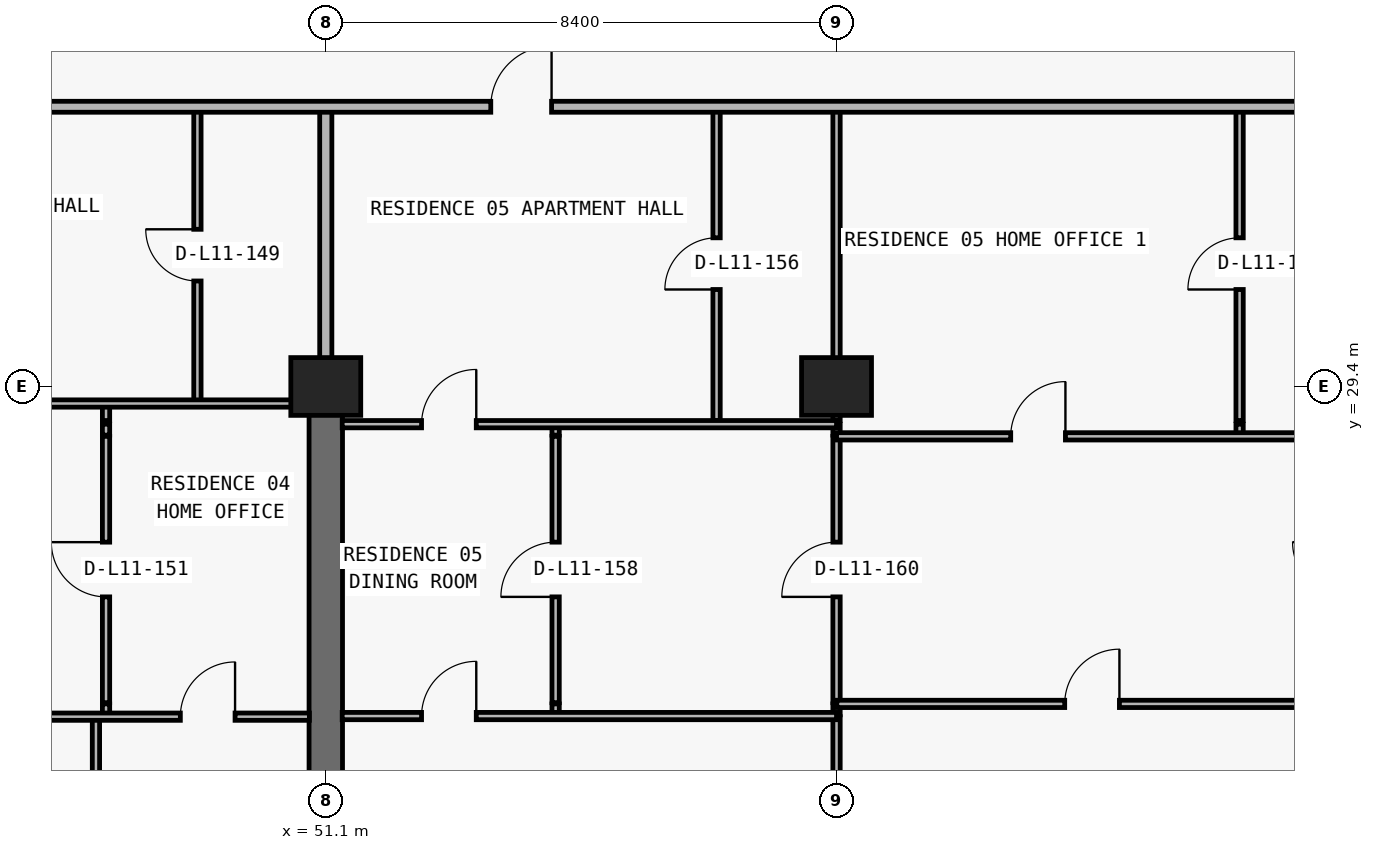
"""IFC4 building model, lengths in metres.
Left out: names, types, materials, properties, quantities, classifications, styles, units other than length and angle.
Written with IfcOpenShell. Run it as: python <this file> out.ifc"""

import sys

from ifc_helpers import new_model, si_unit, direction, frame, frame_2d, origin, origin_2d, place, context, subcontext, project, spatial, rectangle, extrude, element, fill, save


model = new_model("IFC4")
c1 = context("Model", 3, precision=1e-05, world=origin(), true_north=direction((0.0, 1.0)))
c2 = subcontext(c1, "Body", "Model", "MODEL_VIEW")
j1 = project(units=[si_unit("LENGTHUNIT", "METRE"), si_unit("PLANEANGLEUNIT", "RADIAN")], contexts=[c1])
p1 = place(None, origin())
s1 = spatial("IfcSite", under=j1, at=p1, CompositionType="ELEMENT")
p2 = place(p1, origin())
s2 = spatial("IfcBuilding", under=s1, at=p2, CompositionType="ELEMENT")
p3 = place(p2, frame((0.0, 0.0, 46.5)))
s3 = spatial("IfcBuildingStorey", under=s2, at=p3, CompositionType="ELEMENT", Elevation=46.5)
for number, where, z_axis, x_axis in (
    (1, (51.1, 29.4, 0.0), (0.0, 0.0, 1.0), (1.0, 0.0, 0.0)),
    (2, (59.5, 29.4, 0.0), (0.0, 0.0, 1.0), (1.0, 0.0, 0.0)),
):
    element("IfcColumn", number, at=place(p3, frame(where, z_axis=z_axis, x_axis=x_axis)), inside=s3, PredefinedType="COLUMN", context=c2, shape_type="SweptSolid", body=[
        extrude(rectangle(XDim=1.15, YDim=0.95, at=origin_2d()), origin(), (0.0, 0.0, 1.0), 3.05),
    ])
p4 = place(p3, frame((51.1, 20.8, 0.0), z_axis=(0.0, 0.0, 1.0), x_axis=(0.0, 1.0, 0.0)))
e3 = element("IfcWall", 3, at=p4, inside=s3, PredefinedType="SHEAR", context=c2, shape_type="SweptSolid", body=[
    extrude(rectangle(XDim=8.6, YDim=0.55, at=frame_2d((4.3, 0.0))), origin(), (0.0, 0.0, 1.0), 3.05),
])
p5 = place(p3, frame((47.32, 6.24, 0.0), z_axis=(0.0, 0.0, 1.0), x_axis=(0.0, 1.0, 0.0)))
e4 = element("IfcWall", 4, at=p5, inside=s3, PredefinedType="PARTITIONING", context=c2, shape_type="SweptSolid", body=[
    extrude(rectangle(XDim=17.73, YDim=0.12, at=frame_2d((8.865, 0.0))), origin(), (0.0, 0.0, 1.0), 3.05),
])
p6 = place(p3, frame((47.486, 24.0, 0.0), z_axis=(0.0, 0.0, 1.0), x_axis=(0.0, 1.0, 0.0)))
e5 = element("IfcWall", 5, at=p6, inside=s3, PredefinedType="PARTITIONING", context=c2, shape_type="SweptSolid", body=[
    extrude(rectangle(XDim=0.18, YDim=0.12, at=frame_2d((0.09, 0.0))), origin(), (0.0, 0.0, 1.0), 3.05),
])
p7 = place(p3, frame((47.486, 24.2, 0.0), z_axis=(0.0, 0.0, 1.0), x_axis=(0.0, 1.0, 0.0)))
e6 = element("IfcWall", 6, at=p7, inside=s3, PredefinedType="PARTITIONING", context=c2, shape_type="SweptSolid", body=[
    extrude(rectangle(XDim=4.38, YDim=0.12, at=frame_2d((2.19, 0.0))), origin(), (0.0, 0.0, 1.0), 3.05),
])
p8 = place(p7, frame((1.74, 0.0, 0.0)))
e7 = element("IfcOpeningElement", 7, at=p8, cuts=e6, PredefinedType="OPENING", context=c2, shape_type="SweptSolid", body=[
    extrude(rectangle(XDim=0.9, YDim=2.15, at=frame_2d((0.45, 1.075))), frame((0.0, 0.07, 0.0), z_axis=(0.0, -1.0, 0.0), x_axis=(1.0, 0.0, 0.0)), (0.0, 0.0, 1.0), 0.14),
])
p9 = place(p3, frame((47.486, 28.6, 0.0), z_axis=(0.0, 0.0, 1.0), x_axis=(0.0, 1.0, 0.0)))
e8 = element("IfcWall", 8, at=p9, inside=s3, PredefinedType="PARTITIONING", context=c2, shape_type="SweptSolid", body=[
    extrude(rectangle(XDim=0.18, YDim=0.12, at=frame_2d((0.09, 0.0))), origin(), (0.0, 0.0, 1.0), 3.05),
])
p10 = place(p3, frame((47.486, 28.84, 0.0), z_axis=(0.0, 0.0, 1.0), x_axis=(0.0, 1.0, 0.0)))
e9 = element("IfcWall", 9, at=p10, inside=s3, PredefinedType="PARTITIONING", context=c2, shape_type="SweptSolid", body=[
    extrude(rectangle(XDim=0.28, YDim=0.12, at=frame_2d((0.14, 0.0))), origin(), (0.0, 0.0, 1.0), 3.05),
])
p11 = place(p3, frame((48.989, 29.12, 0.0), z_axis=(0.0, 0.0, 1.0), x_axis=(0.0, 1.0, 0.0)))
e10 = element("IfcWall", 10, at=p11, inside=s3, PredefinedType="PARTITIONING", context=c2, shape_type="SweptSolid", body=[
    extrude(rectangle(XDim=4.88, YDim=0.12, at=frame_2d((2.44, 0.0))), origin(), (0.0, 0.0, 1.0), 3.05),
])
p12 = place(p11, frame((2.015, 0.0, 0.0)))
e11 = element("IfcOpeningElement", 11, at=p12, cuts=e10, PredefinedType="OPENING", context=c2, shape_type="SweptSolid", body=[
    extrude(rectangle(XDim=0.85, YDim=2.1, at=frame_2d((0.425, 1.05))), frame((0.0, 0.07, 0.0), z_axis=(0.0, -1.0, 0.0), x_axis=(1.0, 0.0, 0.0)), (0.0, 0.0, 1.0), 0.14),
])
p13 = place(p3, frame((51.1, 29.405, 0.0), z_axis=(0.0, 0.0, 1.0), x_axis=(0.0, 1.0, 0.0)))
e12 = element("IfcWall", 12, at=p13, inside=s3, PredefinedType="PARTITIONING", context=c2, shape_type="SweptSolid", body=[
    extrude(rectangle(XDim=4.595, YDim=0.2, at=frame_2d((2.297, 0.0))), origin(), (0.0, 0.0, 1.0), 2.335),
])
p14 = place(p3, frame((54.88, 24.0, 0.0), z_axis=(0.0, 0.0, 1.0), x_axis=(0.0, 1.0, 0.0)))
e13 = element("IfcWall", 13, at=p14, inside=s3, PredefinedType="PARTITIONING", context=c2, shape_type="SweptSolid", body=[
    extrude(rectangle(XDim=0.18, YDim=0.12, at=frame_2d((0.09, 0.0))), origin(), (0.0, 0.0, 1.0), 3.05),
])
p15 = place(p3, frame((54.88, 24.2, 0.0), z_axis=(0.0, 0.0, 1.0), x_axis=(0.0, 1.0, 0.0)))
e14 = element("IfcWall", 14, at=p15, inside=s3, PredefinedType="PARTITIONING", context=c2, shape_type="SweptSolid", body=[
    extrude(rectangle(XDim=4.38, YDim=0.12, at=frame_2d((2.19, 0.0))), origin(), (0.0, 0.0, 1.0), 3.05),
])
p16 = place(p15, frame((1.74, 0.0, 0.0)))
e15 = element("IfcOpeningElement", 15, at=p16, cuts=e14, PredefinedType="OPENING", context=c2, shape_type="SweptSolid", body=[
    extrude(rectangle(XDim=0.9, YDim=2.15, at=frame_2d((0.45, 1.075))), frame((0.0, 0.07, 0.0), z_axis=(0.0, -1.0, 0.0), x_axis=(1.0, 0.0, 0.0)), (0.0, 0.0, 1.0), 0.14),
])
p17 = place(p3, frame((54.88, 28.6, 0.0), z_axis=(0.0, 0.0, 1.0), x_axis=(0.0, 1.0, 0.0)))
e16 = element("IfcWall", 16, at=p17, inside=s3, PredefinedType="PARTITIONING", context=c2, shape_type="SweptSolid", body=[
    extrude(rectangle(XDim=0.18, YDim=0.12, at=frame_2d((0.09, 0.0))), origin(), (0.0, 0.0, 1.0), 3.05),
])
p18 = place(p3, frame((57.527, 28.84, 0.0), z_axis=(0.0, 0.0, 1.0), x_axis=(0.0, 1.0, 0.0)))
e17 = element("IfcWall", 17, at=p18, inside=s3, PredefinedType="PARTITIONING", context=c2, shape_type="SweptSolid", body=[
    extrude(rectangle(XDim=5.16, YDim=0.12, at=frame_2d((2.58, 0.0))), origin(), (0.0, 0.0, 1.0), 3.05),
])
p19 = place(p18, frame((2.155, 0.0, 0.0)))
e18 = element("IfcOpeningElement", 18, at=p19, cuts=e17, PredefinedType="OPENING", context=c2, shape_type="SweptSolid", body=[
    extrude(rectangle(XDim=0.85, YDim=2.1, at=frame_2d((0.425, 1.05))), frame((0.0, 0.07, 0.0), z_axis=(0.0, -1.0, 0.0), x_axis=(1.0, 0.0, 0.0)), (0.0, 0.0, 1.0), 0.14),
])
p20 = place(p3, frame((59.5, 6.24, 0.0), z_axis=(0.0, 0.0, 1.0), x_axis=(0.0, 1.0, 0.0)))
e19 = element("IfcWall", 19, at=p20, inside=s3, PredefinedType="PARTITIONING", context=c2, shape_type="SweptSolid", body=[
    extrude(rectangle(XDim=17.73, YDim=0.12, at=frame_2d((8.865, 0.0))), origin(), (0.0, 0.0, 1.0), 2.11),
])
p21 = place(p3, frame((59.5, 24.0, 0.0), z_axis=(0.0, 0.0, 1.0), x_axis=(0.0, 1.0, 0.0)))
e20 = element("IfcWall", 20, at=p21, inside=s3, PredefinedType="PARTITIONING", context=c2, shape_type="SweptSolid", body=[
    extrude(rectangle(XDim=0.18, YDim=0.12, at=frame_2d((0.09, 0.0))), origin(), (0.0, 0.0, 1.0), 2.11),
])
p22 = place(p3, frame((59.5, 24.2, 0.0), z_axis=(0.0, 0.0, 1.0), x_axis=(0.0, 1.0, 0.0)))
e21 = element("IfcWall", 21, at=p22, inside=s3, PredefinedType="PARTITIONING", context=c2, shape_type="SweptSolid", body=[
    extrude(rectangle(XDim=4.38, YDim=0.12, at=frame_2d((2.19, 0.0))), origin(), (0.0, 0.0, 1.0), 2.11),
])
p23 = place(p22, frame((1.74, 0.0, 0.0)))
e22 = element("IfcOpeningElement", 22, at=p23, cuts=e21, PredefinedType="OPENING", context=c2, shape_type="SweptSolid", body=[
    extrude(rectangle(XDim=0.9, YDim=2.06, at=frame_2d((0.45, 1.03))), frame((0.0, 0.07, 0.0), z_axis=(0.0, -1.0, 0.0), x_axis=(1.0, 0.0, 0.0)), (0.0, 0.0, 1.0), 0.14),
])
p24 = place(p3, frame((59.5, 28.6, 0.0), z_axis=(0.0, 0.0, 1.0), x_axis=(0.0, 1.0, 0.0)))
e23 = element("IfcWall", 23, at=p24, inside=s3, PredefinedType="PARTITIONING", context=c2, shape_type="SweptSolid", body=[
    extrude(rectangle(XDim=0.18, YDim=0.12, at=frame_2d((0.09, 0.0))), origin(), (0.0, 0.0, 1.0), 2.11),
])
p25 = place(p3, frame((59.5, 28.84, 0.0), z_axis=(0.0, 0.0, 1.0), x_axis=(0.0, 1.0, 0.0)))
e24 = element("IfcWall", 24, at=p25, inside=s3, PredefinedType="PARTITIONING", context=c2, shape_type="SweptSolid", body=[
    extrude(rectangle(XDim=5.16, YDim=0.12, at=frame_2d((2.58, 0.0))), origin(), (0.0, 0.0, 1.0), 2.11),
])
p26 = place(p3, frame((66.129, 28.6, 0.0), z_axis=(0.0, 0.0, 1.0), x_axis=(0.0, 1.0, 0.0)))
e25 = element("IfcWall", 25, at=p26, inside=s3, PredefinedType="PARTITIONING", context=c2, shape_type="SweptSolid", body=[
    extrude(rectangle(XDim=0.18, YDim=0.12, at=frame_2d((0.09, 0.0))), origin(), (0.0, 0.0, 1.0), 3.05),
])
p27 = place(p3, frame((66.129, 28.84, 0.0), z_axis=(0.0, 0.0, 1.0), x_axis=(0.0, 1.0, 0.0)))
e26 = element("IfcWall", 26, at=p27, inside=s3, PredefinedType="PARTITIONING", context=c2, shape_type="SweptSolid", body=[
    extrude(rectangle(XDim=5.16, YDim=0.12, at=frame_2d((2.58, 0.0))), origin(), (0.0, 0.0, 1.0), 3.05),
])
p28 = place(p27, frame((2.155, 0.0, 0.0)))
e27 = element("IfcOpeningElement", 27, at=p28, cuts=e26, PredefinedType="OPENING", context=c2, shape_type="SweptSolid", body=[
    extrude(rectangle(XDim=0.85, YDim=2.1, at=frame_2d((0.425, 1.05))), frame((0.0, 0.07, 0.0), z_axis=(0.0, -1.0, 0.0), x_axis=(1.0, 0.0, 0.0)), (0.0, 0.0, 1.0), 0.14),
])
p29 = place(p3, frame((42.7, 23.97, 0.0), z_axis=(0.0, 0.0, 1.0), x_axis=(1.0, 0.0, 0.0)))
e28 = element("IfcWall", 28, at=p29, inside=s3, PredefinedType="PARTITIONING", context=c2, shape_type="SweptSolid", body=[
    extrude(rectangle(XDim=8.13, YDim=0.12, at=frame_2d((4.065, 0.0))), origin(), (0.0, 0.0, 1.0), 3.05),
])
p30 = place(p29, frame((1.86, 0.0, 0.0)))
e29 = element("IfcOpeningElement", 29, at=p30, cuts=e28, PredefinedType="OPENING", context=c2, shape_type="SweptSolid", body=[
    extrude(rectangle(XDim=0.9, YDim=2.15, at=frame_2d((0.45, 1.075))), frame((0.0, 0.07, 0.0), z_axis=(0.0, -1.0, 0.0), x_axis=(1.0, 0.0, 0.0)), (0.0, 0.0, 1.0), 0.14),
])
p31 = place(p29, frame((6.008, 0.0, 0.0)))
e30 = element("IfcOpeningElement", 30, at=p31, cuts=e28, PredefinedType="OPENING", context=c2, shape_type="SweptSolid", body=[
    extrude(rectangle(XDim=0.9, YDim=2.15, at=frame_2d((0.45, 1.075))), frame((0.0, 0.07, 0.0), z_axis=(0.0, -1.0, 0.0), x_axis=(1.0, 0.0, 0.0)), (0.0, 0.0, 1.0), 0.14),
])
p32 = place(p3, frame((51.37, 23.98, 0.0), z_axis=(0.0, 0.0, 1.0), x_axis=(1.0, 0.0, 0.0)))
e31 = element("IfcWall", 31, at=p32, inside=s3, PredefinedType="PARTITIONING", context=c2, shape_type="SweptSolid", body=[
    extrude(rectangle(XDim=8.13, YDim=0.12, at=frame_2d((4.065, 0.0))), origin(), (0.0, 0.0, 1.0), 3.05),
])
p33 = place(p32, frame((1.305, 0.0, 0.0)))
e32 = element("IfcOpeningElement", 32, at=p33, cuts=e31, PredefinedType="OPENING", context=c2, shape_type="SweptSolid", body=[
    extrude(rectangle(XDim=0.9, YDim=2.15, at=frame_2d((0.45, 1.075))), frame((0.0, 0.07, 0.0), z_axis=(0.0, -1.0, 0.0), x_axis=(1.0, 0.0, 0.0)), (0.0, 0.0, 1.0), 0.14),
])
p34 = place(p3, frame((59.505, 24.18, 0.0), z_axis=(0.0, 0.0, 1.0), x_axis=(1.0, 0.0, 0.0)))
e33 = element("IfcWall", 33, at=p34, inside=s3, PredefinedType="PARTITIONING", context=c2, shape_type="SweptSolid", body=[
    extrude(rectangle(XDim=8.395, YDim=0.12, at=frame_2d((4.198, 0.0))), origin(), (0.0, 0.0, 1.0), 3.05),
])
p35 = place(p34, frame((3.748, 0.0, 0.0)))
e34 = element("IfcOpeningElement", 34, at=p35, cuts=e33, PredefinedType="OPENING", context=c2, shape_type="SweptSolid", body=[
    extrude(rectangle(XDim=0.9, YDim=2.15, at=frame_2d((0.45, 1.075))), frame((0.0, 0.07, 0.0), z_axis=(0.0, -1.0, 0.0), x_axis=(1.0, 0.0, 0.0)), (0.0, 0.0, 1.0), 0.14),
])
p36 = place(p3, frame((59.5, 28.58, 0.0), z_axis=(0.0, 0.0, 1.0), x_axis=(1.0, 0.0, 0.0)))
e35 = element("IfcWall", 35, at=p36, inside=s3, PredefinedType="PARTITIONING", context=c2, shape_type="SweptSolid", body=[
    extrude(rectangle(XDim=8.4, YDim=0.12, at=frame_2d((4.2, 0.0))), origin(), (0.0, 0.0, 1.0), 3.05),
])
p37 = place(p36, frame((2.865, 0.0, 0.0)))
e36 = element("IfcOpeningElement", 36, at=p37, cuts=e35, PredefinedType="OPENING", context=c2, shape_type="SweptSolid", body=[
    extrude(rectangle(XDim=0.9, YDim=2.15, at=frame_2d((0.45, 1.075))), frame((0.0, 0.07, 0.0), z_axis=(0.0, -1.0, 0.0), x_axis=(1.0, 0.0, 0.0)), (0.0, 0.0, 1.0), 0.14),
])
p38 = place(p3, frame((51.37, 28.78, 0.0), z_axis=(0.0, 0.0, 1.0), x_axis=(1.0, 0.0, 0.0)))
e37 = element("IfcWall", 37, at=p38, inside=s3, PredefinedType="PARTITIONING", context=c2, shape_type="SweptSolid", body=[
    extrude(rectangle(XDim=8.13, YDim=0.12, at=frame_2d((4.065, 0.0))), origin(), (0.0, 0.0, 1.0), 3.05),
])
p39 = place(p38, frame((1.305, 0.0, 0.0)))
e38 = element("IfcOpeningElement", 38, at=p39, cuts=e37, PredefinedType="OPENING", context=c2, shape_type="SweptSolid", body=[
    extrude(rectangle(XDim=0.9, YDim=2.15, at=frame_2d((0.45, 1.075))), frame((0.0, 0.07, 0.0), z_axis=(0.0, -1.0, 0.0), x_axis=(1.0, 0.0, 0.0)), (0.0, 0.0, 1.0), 0.14),
])
p40 = place(p3, frame((42.7, 29.12, 0.0), z_axis=(0.0, 0.0, 1.0), x_axis=(1.0, 0.0, 0.0)))
e39 = element("IfcWall", 39, at=p40, inside=s3, PredefinedType="PARTITIONING", context=c2, shape_type="SweptSolid", body=[
    extrude(rectangle(XDim=8.13, YDim=0.12, at=frame_2d((4.065, 0.0))), origin(), (0.0, 0.0, 1.0), 2.11),
])
p41 = place(p40, frame((1.943, 0.0, 0.0)))
e40 = element("IfcOpeningElement", 40, at=p41, cuts=e39, PredefinedType="OPENING", context=c2, shape_type="SweptSolid", body=[
    extrude(rectangle(XDim=0.9, YDim=2.06, at=frame_2d((0.45, 1.03))), frame((0.0, 0.07, 0.0), z_axis=(0.0, -1.0, 0.0), x_axis=(1.0, 0.0, 0.0)), (0.0, 0.0, 1.0), 0.14),
])
p42 = place(p3, frame((31.4, 34.0, 0.0), z_axis=(0.0, 0.0, 1.0), x_axis=(1.0, 0.0, 0.0)))
e41 = element("IfcWall", 41, at=p42, inside=s3, PredefinedType="PARTITIONING", context=c2, shape_type="SweptSolid", body=[
    extrude(rectangle(XDim=41.3, YDim=0.18, at=frame_2d((20.65, 0.0))), origin(), (0.0, 0.0, 1.0), 3.05),
])
p43 = place(p42, frame((6.07, 0.0, 0.0)))
e42 = element("IfcOpeningElement", 42, at=p43, cuts=e41, PredefinedType="OPENING", context=c2, shape_type="SweptSolid", body=[
    extrude(rectangle(XDim=1.0, YDim=2.2, at=frame_2d((0.5, 1.1))), frame((0.0, 0.1, 0.0), z_axis=(0.0, -1.0, 0.0), x_axis=(1.0, 0.0, 0.0)), (0.0, 0.0, 1.0), 0.2),
])
p44 = place(p42, frame((13.945, 0.0, 0.0)))
e43 = element("IfcOpeningElement", 43, at=p44, cuts=e41, PredefinedType="OPENING", context=c2, shape_type="SweptSolid", body=[
    extrude(rectangle(XDim=1.0, YDim=2.2, at=frame_2d((0.5, 1.1))), frame((0.0, 0.1, 0.0), z_axis=(0.0, -1.0, 0.0), x_axis=(1.0, 0.0, 0.0)), (0.0, 0.0, 1.0), 0.2),
])
p45 = place(p42, frame((22.414, 0.0, 0.0)))
e44 = element("IfcOpeningElement", 44, at=p45, cuts=e41, PredefinedType="OPENING", context=c2, shape_type="SweptSolid", body=[
    extrude(rectangle(XDim=1.0, YDim=2.2, at=frame_2d((0.5, 1.1))), frame((0.0, 0.1, 0.0), z_axis=(0.0, -1.0, 0.0), x_axis=(1.0, 0.0, 0.0)), (0.0, 0.0, 1.0), 0.2),
])
p46 = place(p12, origin())
e45 = element("IfcDoor", 45, at=p46, inside=s3, OperationType="SINGLE_SWING_RIGHT", PredefinedType="DOOR", context=c2, shape_type="SweptSolid", body=[
    extrude(rectangle(XDim=0.85, YDim=2.1, at=frame_2d((0.425, 1.05))), frame((0.0, 0.025, 0.0), z_axis=(0.0, -1.0, 0.0), x_axis=(1.0, 0.0, 0.0)), (0.0, 0.0, 1.0), 0.05),
])
fill(e11, e45)
p47 = place(p8, origin())
e46 = element("IfcDoor", 46, at=p47, inside=s3, OperationType="SINGLE_SWING_RIGHT", PredefinedType="DOOR", context=c2, shape_type="SweptSolid", body=[
    extrude(rectangle(XDim=0.9, YDim=2.15, at=frame_2d((0.45, 1.075))), frame((0.0, 0.025, 0.0), z_axis=(0.0, -1.0, 0.0), x_axis=(1.0, 0.0, 0.0)), (0.0, 0.0, 1.0), 0.05),
])
fill(e7, e46)
p48 = place(p31, origin())
e47 = element("IfcDoor", 47, at=p48, inside=s3, OperationType="SINGLE_SWING_RIGHT", PredefinedType="DOOR", context=c2, shape_type="SweptSolid", body=[
    extrude(rectangle(XDim=0.9, YDim=2.15, at=frame_2d((0.45, 1.075))), frame((0.0, 0.025, 0.0), z_axis=(0.0, -1.0, 0.0), x_axis=(1.0, 0.0, 0.0)), (0.0, 0.0, 1.0), 0.05),
])
fill(e30, e47)
p49 = place(p45, origin())
e48 = element("IfcDoor", 48, at=p49, inside=s3, OperationType="SINGLE_SWING_RIGHT", PredefinedType="DOOR", context=c2, shape_type="SweptSolid", body=[
    extrude(rectangle(XDim=1.0, YDim=2.2, at=frame_2d((0.5, 1.1))), frame((0.0, 0.025, 0.0), z_axis=(0.0, -1.0, 0.0), x_axis=(1.0, 0.0, 0.0)), (0.0, 0.0, 1.0), 0.05),
])
fill(e44, e48)
p50 = place(p19, origin())
e49 = element("IfcDoor", 49, at=p50, inside=s3, OperationType="SINGLE_SWING_LEFT", PredefinedType="DOOR", context=c2, shape_type="SweptSolid", body=[
    extrude(rectangle(XDim=0.85, YDim=2.1, at=frame_2d((0.425, 1.05))), frame((0.0, 0.025, 0.0), z_axis=(0.0, -1.0, 0.0), x_axis=(1.0, 0.0, 0.0)), (0.0, 0.0, 1.0), 0.05),
])
fill(e18, e49)
p51 = place(p39, origin())
e50 = element("IfcDoor", 50, at=p51, inside=s3, OperationType="SINGLE_SWING_RIGHT", PredefinedType="DOOR", context=c2, shape_type="SweptSolid", body=[
    extrude(rectangle(XDim=0.9, YDim=2.15, at=frame_2d((0.45, 1.075))), frame((0.0, 0.025, 0.0), z_axis=(0.0, -1.0, 0.0), x_axis=(1.0, 0.0, 0.0)), (0.0, 0.0, 1.0), 0.05),
])
fill(e38, e50)
p52 = place(p16, origin())
e51 = element("IfcDoor", 51, at=p52, inside=s3, OperationType="SINGLE_SWING_LEFT", PredefinedType="DOOR", context=c2, shape_type="SweptSolid", body=[
    extrude(rectangle(XDim=0.9, YDim=2.15, at=frame_2d((0.45, 1.075))), frame((0.0, 0.025, 0.0), z_axis=(0.0, -1.0, 0.0), x_axis=(1.0, 0.0, 0.0)), (0.0, 0.0, 1.0), 0.05),
])
fill(e15, e51)
p53 = place(p33, origin())
e52 = element("IfcDoor", 52, at=p53, inside=s3, OperationType="SINGLE_SWING_RIGHT", PredefinedType="DOOR", context=c2, shape_type="SweptSolid", body=[
    extrude(rectangle(XDim=0.9, YDim=2.15, at=frame_2d((0.45, 1.075))), frame((0.0, 0.025, 0.0), z_axis=(0.0, -1.0, 0.0), x_axis=(1.0, 0.0, 0.0)), (0.0, 0.0, 1.0), 0.05),
])
fill(e32, e52)
p54 = place(p23, origin())
e53 = element("IfcDoor", 53, at=p54, inside=s3, OperationType="SINGLE_SWING_LEFT", PredefinedType="DOOR", context=c2, shape_type="SweptSolid", body=[
    extrude(rectangle(XDim=0.9, YDim=2.06, at=frame_2d((0.45, 1.03))), frame((0.0, 0.025, 0.0), z_axis=(0.0, -1.0, 0.0), x_axis=(1.0, 0.0, 0.0)), (0.0, 0.0, 1.0), 0.05),
])
fill(e22, e53)
p55 = place(p37, origin())
e54 = element("IfcDoor", 54, at=p55, inside=s3, OperationType="SINGLE_SWING_RIGHT", PredefinedType="DOOR", context=c2, shape_type="SweptSolid", body=[
    extrude(rectangle(XDim=0.9, YDim=2.15, at=frame_2d((0.45, 1.075))), frame((0.0, 0.025, 0.0), z_axis=(0.0, -1.0, 0.0), x_axis=(1.0, 0.0, 0.0)), (0.0, 0.0, 1.0), 0.05),
])
fill(e36, e54)
p56 = place(p28, origin())
e55 = element("IfcDoor", 55, at=p56, inside=s3, OperationType="SINGLE_SWING_LEFT", PredefinedType="DOOR", context=c2, shape_type="SweptSolid", body=[
    extrude(rectangle(XDim=0.85, YDim=2.1, at=frame_2d((0.425, 1.05))), frame((0.0, 0.025, 0.0), z_axis=(0.0, -1.0, 0.0), x_axis=(1.0, 0.0, 0.0)), (0.0, 0.0, 1.0), 0.05),
])
fill(e27, e55)
p57 = place(p35, origin())
e56 = element("IfcDoor", 56, at=p57, inside=s3, OperationType="SINGLE_SWING_RIGHT", PredefinedType="DOOR", context=c2, shape_type="SweptSolid", body=[
    extrude(rectangle(XDim=0.9, YDim=2.15, at=frame_2d((0.45, 1.075))), frame((0.0, 0.025, 0.0), z_axis=(0.0, -1.0, 0.0), x_axis=(1.0, 0.0, 0.0)), (0.0, 0.0, 1.0), 0.05),
])
fill(e34, e56)
save(model, sys.argv[1])
